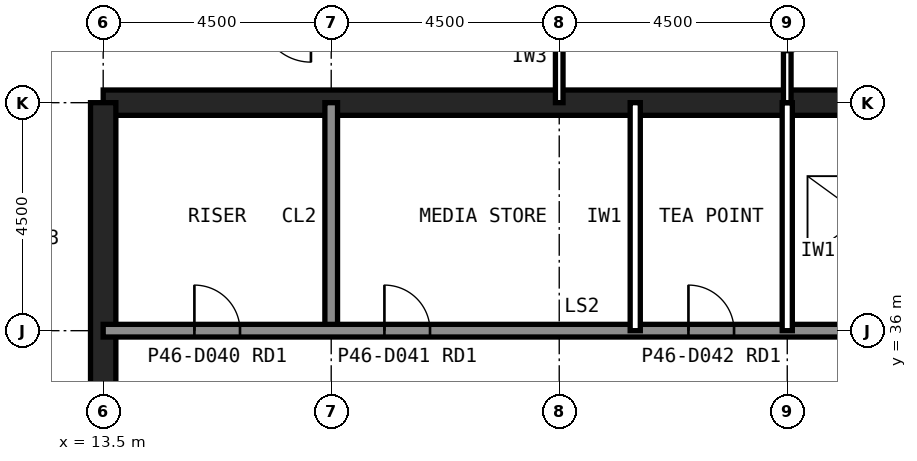
"""IFC4 building model, lengths in metres.
Left out: names, types, materials, properties, quantities, classifications, styles, units other than length and angle.
Written with IfcOpenShell. Run it as: python <this file> out.ifc"""

import sys

from ifc_helpers import new_model, si_unit, direction, frame, frame_2d, origin, place, context, subcontext, project, spatial, rectangle, extrude, element, fill, save


model = new_model("IFC4")
c1 = context("Model", 3, precision=1e-05, world=origin(), true_north=direction((0.0, 1.0)))
c2 = subcontext(c1, "Body", "Model", "MODEL_VIEW")
j1 = project(units=[si_unit("LENGTHUNIT", "METRE"), si_unit("PLANEANGLEUNIT", "RADIAN")], contexts=[c1])
p1 = place(None, origin())
s1 = spatial("IfcSite", under=j1, at=p1, CompositionType="ELEMENT")
p2 = place(p1, origin())
s2 = spatial("IfcBuilding", under=s1, at=p2, CompositionType="ELEMENT")
p3 = place(p2, frame((0.0, 0.0, 191.6)))
s3 = spatial("IfcBuildingStorey", under=s2, at=p3, CompositionType="ELEMENT", Elevation=191.6)
p4 = place(p3, frame((40.5, 40.5, 0.0), z_axis=(0.0, 0.0, 1.0), x_axis=(-1.0, 0.0, 0.0)))
e1 = element("IfcWall", 1, at=p4, inside=s3, PredefinedType="SHEAR", context=c2, shape_type="SweptSolid", body=[
    extrude(rectangle(XDim=27.0, YDim=0.5, at=frame_2d((13.5, 0.0))), origin(), (0.0, 0.0, 1.0), 4.0),
])
p5 = place(p3, frame((13.5, 40.5, 0.0), z_axis=(0.0, 0.0, 1.0), x_axis=(0.0, -1.0, 0.0)))
e2 = element("IfcWall", 2, at=p5, inside=s3, PredefinedType="SHEAR", context=c2, shape_type="SweptSolid", body=[
    extrude(rectangle(XDim=27.0, YDim=0.5, at=frame_2d((13.5, 0.0))), origin(), (0.0, 0.0, 1.0), 4.0),
])
p6 = place(p5, frame((19.65, 0.0, 0.0)))
e3 = element("IfcOpeningElement", 3, at=p6, cuts=e2, PredefinedType="OPENING", context=c2, shape_type="SweptSolid", body=[
    extrude(rectangle(XDim=1.2, YDim=2.1, at=frame_2d((0.6, 1.05))), frame((0.0, 0.26, 0.0), z_axis=(0.0, -1.0, 0.0), x_axis=(1.0, 0.0, 0.0)), (0.0, 0.0, 1.0), 0.52),
])
p7 = place(p5, frame((5.85, 0.0, 0.0)))
e4 = element("IfcOpeningElement", 4, at=p7, cuts=e2, PredefinedType="OPENING", context=c2, shape_type="SweptSolid", body=[
    extrude(rectangle(XDim=1.8, YDim=2.1, at=frame_2d((0.9, 1.05))), frame((0.0, 0.26, 0.0), z_axis=(0.0, -1.0, 0.0), x_axis=(1.0, 0.0, 0.0)), (0.0, 0.0, 1.0), 0.52),
])
p8 = place(p3, frame((18.0, 36.0, 0.0), z_axis=(0.0, 0.0, 1.0), x_axis=(0.0, 1.0, 0.0)))
e5 = element("IfcWall", 5, at=p8, inside=s3, PredefinedType="SOLIDWALL", context=c2, shape_type="SweptSolid", body=[
    extrude(rectangle(XDim=4.5, YDim=0.25, at=frame_2d((2.25, 0.0))), origin(), (0.0, 0.0, 1.0), 3.84),
])
p9 = place(p3, frame((13.5, 36.0, 0.0), z_axis=(0.0, 0.0, 1.0), x_axis=(1.0, 0.0, 0.0)))
e6 = element("IfcWall", 6, at=p9, inside=s3, PredefinedType="SOLIDWALL", context=c2, shape_type="SweptSolid", body=[
    extrude(rectangle(XDim=27.0, YDim=0.25, at=frame_2d((13.5, 0.0))), origin(), (0.0, 0.0, 1.0), 3.84),
])
p10 = place(p9, frame((1.8, 0.0, 0.0)))
e7 = element("IfcOpeningElement", 7, at=p10, cuts=e6, PredefinedType="OPENING", context=c2, shape_type="SweptSolid", body=[
    extrude(rectangle(XDim=0.9, YDim=2.1, at=frame_2d((0.45, 1.05))), frame((0.0, 0.135, 0.0), z_axis=(0.0, -1.0, 0.0), x_axis=(1.0, 0.0, 0.0)), (0.0, 0.0, 1.0), 0.27),
])
p11 = place(p9, frame((5.55, 0.0, 0.0)))
e8 = element("IfcOpeningElement", 8, at=p11, cuts=e6, PredefinedType="OPENING", context=c2, shape_type="SweptSolid", body=[
    extrude(rectangle(XDim=0.9, YDim=2.1, at=frame_2d((0.45, 1.05))), frame((0.0, 0.135, 0.0), z_axis=(0.0, -1.0, 0.0), x_axis=(1.0, 0.0, 0.0)), (0.0, 0.0, 1.0), 0.27),
])
p12 = place(p9, frame((8.55, 0.0, 0.0)))
e9 = element("IfcOpeningElement", 9, at=p12, cuts=e6, PredefinedType="OPENING", context=c2, shape_type="SweptSolid", body=[
    extrude(rectangle(XDim=0.9, YDim=2.1, at=frame_2d((0.45, 1.05))), frame((0.0, 0.135, 0.0), z_axis=(0.0, -1.0, 0.0), x_axis=(1.0, 0.0, 0.0)), (0.0, 0.0, 1.0), 0.27),
])
p13 = place(p9, frame((11.55, 0.0, 0.0)))
e10 = element("IfcOpeningElement", 10, at=p13, cuts=e6, PredefinedType="OPENING", context=c2, shape_type="SweptSolid", body=[
    extrude(rectangle(XDim=0.9, YDim=2.1, at=frame_2d((0.45, 1.05))), frame((0.0, 0.135, 0.0), z_axis=(0.0, -1.0, 0.0), x_axis=(1.0, 0.0, 0.0)), (0.0, 0.0, 1.0), 0.27),
])
p14 = place(p9, frame((24.1, 0.0, 0.0)))
e11 = element("IfcOpeningElement", 11, at=p14, cuts=e6, PredefinedType="OPENING", context=c2, shape_type="SweptSolid", body=[
    extrude(rectangle(XDim=1.3, YDim=2.2, at=frame_2d((0.65, 1.1))), frame((0.0, 0.135, 0.0), z_axis=(0.0, -1.0, 0.0), x_axis=(1.0, 0.0, 0.0)), (0.0, 0.0, 1.0), 0.27),
])
for number, where, z_axis, x_axis in (
    (12, (21.0, 36.0, 0.0), (0.0, 0.0, 1.0), (0.0, 1.0, 0.0)),
    (13, (24.0, 36.0, 0.0), (0.0, 0.0, 1.0), (0.0, 1.0, 0.0)),
    (14, (27.0, 36.0, 0.0), (0.0, 0.0, 1.0), (0.0, 1.0, 0.0)),
):
    element("IfcWall", number, at=place(p3, frame(where, z_axis=z_axis, x_axis=x_axis)), inside=s3, PredefinedType="PARTITIONING", context=c2, shape_type="SweptSolid", body=[
        extrude(rectangle(XDim=4.5, YDim=0.2, at=frame_2d((2.25, 0.0))), origin(), (0.0, 0.0, 1.0), 3.84),
    ])
p15 = place(p3, frame((13.51, 40.5, 0.0), z_axis=(0.0, 0.0, 1.0), x_axis=(-1.0, 0.0, 0.0)))
e15 = element("IfcWall", 15, at=p15, inside=s3, PredefinedType="PARTITIONING", context=c2, shape_type="SweptSolid", body=[
    extrude(rectangle(XDim=1.81, YDim=0.15, at=frame_2d((0.905, 0.0))), origin(), (0.0, 0.0, 1.0), 2.989),
])
p16 = place(p3, frame((27.0, 43.5, 0.0), z_axis=(0.0, 0.0, 1.0), x_axis=(0.0, -1.0, 0.0)))
e16 = element("IfcWall", 16, at=p16, inside=s3, PredefinedType="PARTITIONING", context=c2, shape_type="SweptSolid", body=[
    extrude(rectangle(XDim=3.0, YDim=0.15, at=frame_2d((1.5, 0.0))), origin(), (0.0, 0.0, 1.0), 2.989),
])
p17 = place(p16, frame((1.0, 0.0, 0.0)))
e17 = element("IfcOpeningElement", 17, at=p17, cuts=e16, PredefinedType="OPENING", context=c2, shape_type="SweptSolid", body=[
    extrude(rectangle(XDim=1.0, YDim=2.1, at=frame_2d((0.5, 1.05))), frame((0.0, 0.085, 0.0), z_axis=(0.0, -1.0, 0.0), x_axis=(1.0, 0.0, 0.0)), (0.0, 0.0, 1.0), 0.17),
])
p18 = place(p3, frame((22.5, 40.5, 0.0), z_axis=(0.0, 0.0, 1.0), x_axis=(0.0, 1.0, 0.0)))
e18 = element("IfcWall", 18, at=p18, inside=s3, PredefinedType="PARTITIONING", context=c2, shape_type="SweptSolid", body=[
    extrude(rectangle(XDim=9.0, YDim=0.15, at=frame_2d((4.5, 0.0))), origin(), (0.0, 0.0, 1.0), 2.989),
])
p19 = place(p18, frame((4.0, 0.0, 0.0)))
e19 = element("IfcOpeningElement", 19, at=p19, cuts=e18, PredefinedType="OPENING", context=c2, shape_type="SweptSolid", body=[
    extrude(rectangle(XDim=1.0, YDim=2.1, at=frame_2d((0.5, 1.05))), frame((0.0, 0.085, 0.0), z_axis=(0.0, -1.0, 0.0), x_axis=(1.0, 0.0, 0.0)), (0.0, 0.0, 1.0), 0.17),
])
p20 = place(p3, frame((13.5, 40.5, 0.0), z_axis=(0.0, 0.0, 1.0), x_axis=(0.0, 1.0, 0.0)))
e20 = element("IfcWall", 20, at=p20, inside=s3, PredefinedType="PARTITIONING", context=c2, shape_type="SweptSolid", body=[
    extrude(rectangle(XDim=9.0, YDim=0.15, at=frame_2d((4.5, 0.0))), origin(), (0.0, 0.0, 1.0), 2.989),
])
p21 = place(p20, frame((4.0, 0.0, 0.0)))
e21 = element("IfcOpeningElement", 21, at=p21, cuts=e20, PredefinedType="OPENING", context=c2, shape_type="SweptSolid", body=[
    extrude(rectangle(XDim=1.0, YDim=2.1, at=frame_2d((0.5, 1.05))), frame((0.0, 0.085, 0.0), z_axis=(0.0, -1.0, 0.0), x_axis=(1.0, 0.0, 0.0)), (0.0, 0.0, 1.0), 0.17),
])
p22 = place(p10, origin())
e22 = element("IfcDoor", 22, at=p22, inside=s3, OperationType="SINGLE_SWING_LEFT", PredefinedType="DOOR", context=c2, shape_type="SweptSolid", body=[
    extrude(rectangle(XDim=0.9, YDim=2.1, at=frame_2d((0.45, 1.05))), frame((0.0, 0.025, 0.0), z_axis=(0.0, -1.0, 0.0), x_axis=(1.0, 0.0, 0.0)), (0.0, 0.0, 1.0), 0.05),
])
fill(e7, e22)
p23 = place(p11, origin())
e23 = element("IfcDoor", 23, at=p23, inside=s3, OperationType="SINGLE_SWING_LEFT", PredefinedType="DOOR", context=c2, shape_type="SweptSolid", body=[
    extrude(rectangle(XDim=0.9, YDim=2.1, at=frame_2d((0.45, 1.05))), frame((0.0, 0.025, 0.0), z_axis=(0.0, -1.0, 0.0), x_axis=(1.0, 0.0, 0.0)), (0.0, 0.0, 1.0), 0.05),
])
fill(e8, e23)
p24 = place(p12, origin())
e24 = element("IfcDoor", 24, at=p24, inside=s3, OperationType="SINGLE_SWING_LEFT", PredefinedType="DOOR", context=c2, shape_type="SweptSolid", body=[
    extrude(rectangle(XDim=0.9, YDim=2.1, at=frame_2d((0.45, 1.05))), frame((0.0, 0.025, 0.0), z_axis=(0.0, -1.0, 0.0), x_axis=(1.0, 0.0, 0.0)), (0.0, 0.0, 1.0), 0.05),
])
fill(e9, e24)
p25 = place(p13, origin())
e25 = element("IfcDoor", 25, at=p25, inside=s3, OperationType="SINGLE_SWING_LEFT", PredefinedType="DOOR", context=c2, shape_type="SweptSolid", body=[
    extrude(rectangle(XDim=0.9, YDim=2.1, at=frame_2d((0.45, 1.05))), frame((0.0, 0.025, 0.0), z_axis=(0.0, -1.0, 0.0), x_axis=(1.0, 0.0, 0.0)), (0.0, 0.0, 1.0), 0.05),
])
fill(e10, e25)
save(model, sys.argv[1])
